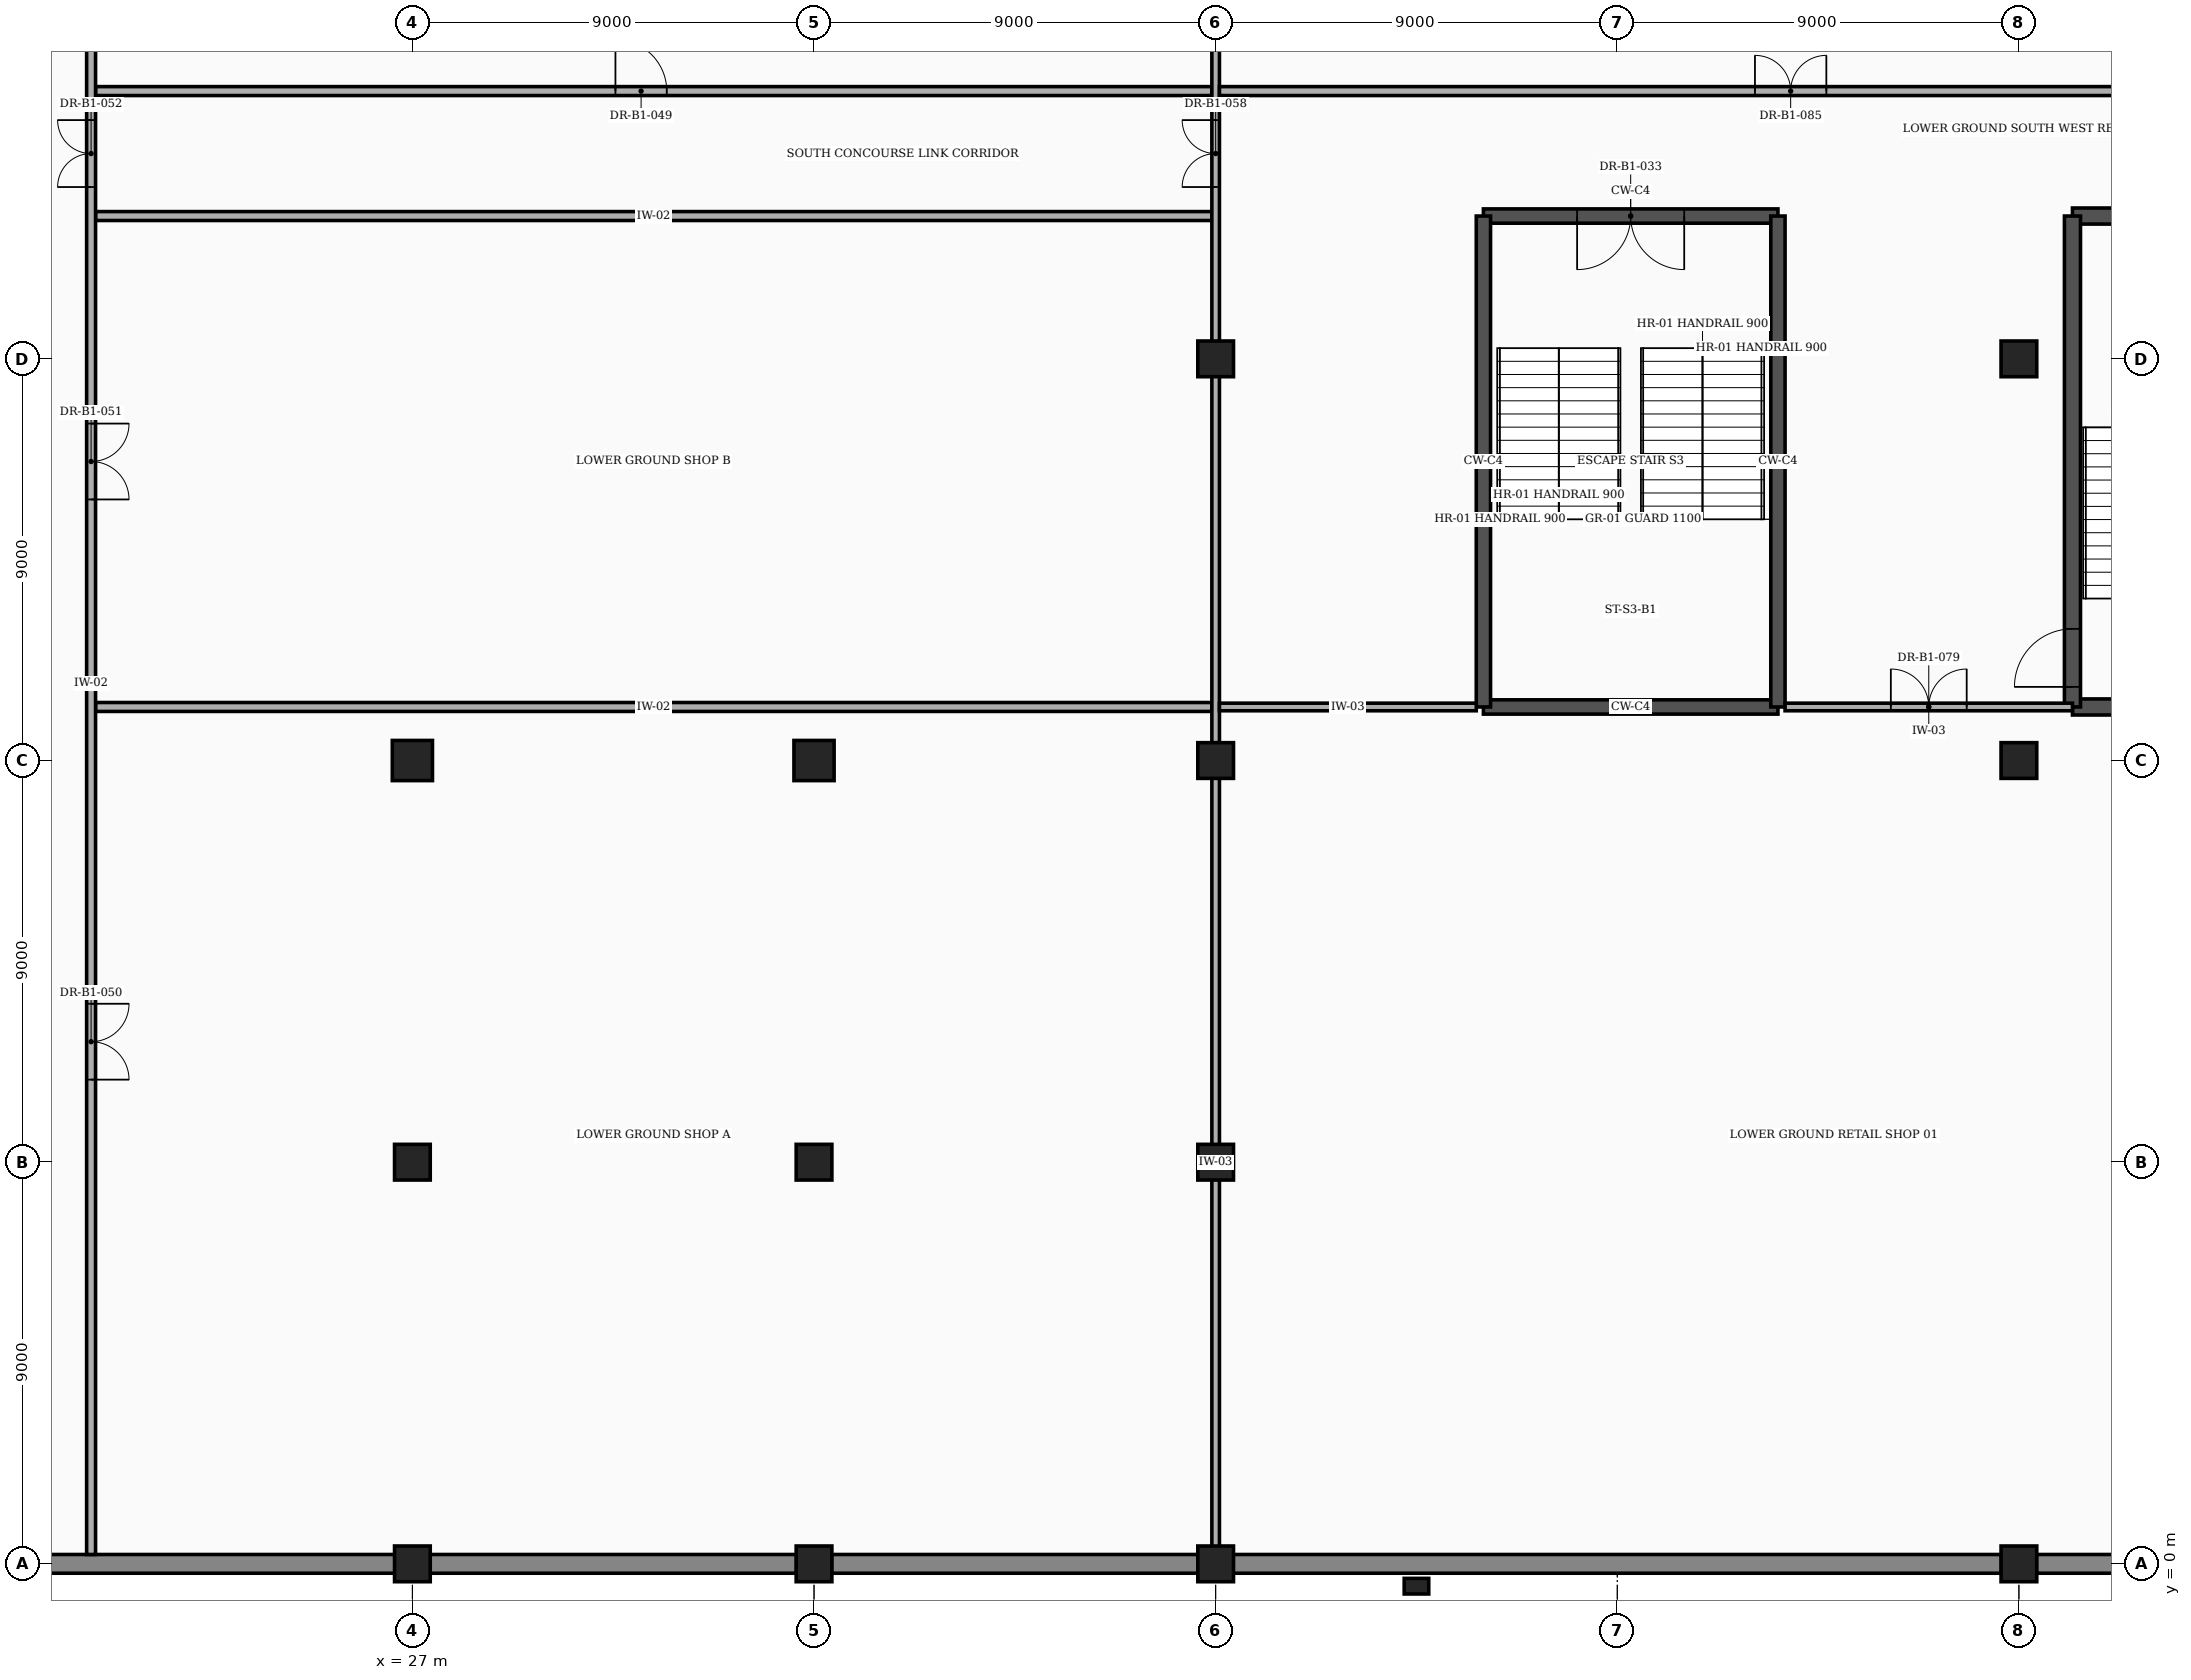
"""IFC4 building model, lengths in metres.
Left out: names, types, materials, properties, quantities, classifications, styles, units other than length and angle.
Written with IfcOpenShell. Run it as: python <this file> out.ifc"""

import sys

from ifc_helpers import new_model, si_unit, direction, frame, frame_2d, origin, origin_2d, place, context, subcontext, project, spatial, rectangle, extrude, element, fill, save


model = new_model("IFC4")
c1 = context("Model", 3, precision=1e-05, world=origin(), true_north=direction((0.0, 1.0)))
c2 = subcontext(c1, "Body", "Model", "MODEL_VIEW")
j1 = project(units=[si_unit("LENGTHUNIT", "METRE"), si_unit("PLANEANGLEUNIT", "RADIAN")], contexts=[c1])
p1 = place(None, origin())
s1 = spatial("IfcSite", under=j1, at=p1, CompositionType="ELEMENT")
p2 = place(p1, origin())
s2 = spatial("IfcBuilding", under=s1, at=p2, CompositionType="ELEMENT")
p3 = place(p2, frame((0.0, 0.0, -4.5)))
s3 = spatial("IfcBuildingStorey", under=s2, at=p3, CompositionType="ELEMENT", Elevation=-4.5)
for number, where, z_axis, x_axis in (
    (1, (27.0, 0.0, -0.45), (0.0, 0.0, 1.0), (1.0, 0.0, 0.0)),
    (2, (27.0, 9.0, -0.45), (0.0, 0.0, 1.0), (1.0, 0.0, 0.0)),
):
    element("IfcColumn", number, at=place(p3, frame(where, z_axis=z_axis, x_axis=x_axis)), inside=s3, PredefinedType="COLUMN", context=c2, shape_type="SweptSolid", body=[
        extrude(rectangle(XDim=0.8, YDim=0.8, at=origin_2d()), origin(), (0.0, 0.0, 1.0), 4.95),
    ])
p4 = place(p3, frame((27.0, 18.0, -0.45), z_axis=(0.0, 0.0, 1.0), x_axis=(1.0, 0.0, 0.0)))
e3 = element("IfcColumn", 3, at=p4, inside=s3, PredefinedType="COLUMN", context=c2, shape_type="SweptSolid", body=[
    extrude(rectangle(XDim=0.9, YDim=0.9, at=origin_2d()), origin(), (0.0, 0.0, 1.0), 4.95),
])
for number, where, z_axis, x_axis in (
    (4, (36.0, 0.0, -0.45), (0.0, 0.0, 1.0), (1.0, 0.0, 0.0)),
    (5, (36.0, 9.0, -0.45), (0.0, 0.0, 1.0), (1.0, 0.0, 0.0)),
):
    element("IfcColumn", number, at=place(p3, frame(where, z_axis=z_axis, x_axis=x_axis)), inside=s3, PredefinedType="COLUMN", context=c2, shape_type="SweptSolid", body=[
        extrude(rectangle(XDim=0.8, YDim=0.8, at=origin_2d()), origin(), (0.0, 0.0, 1.0), 4.95),
    ])
p5 = place(p3, frame((36.0, 18.0, -0.45), z_axis=(0.0, 0.0, 1.0), x_axis=(1.0, 0.0, 0.0)))
e6 = element("IfcColumn", 6, at=p5, inside=s3, PredefinedType="COLUMN", context=c2, shape_type="SweptSolid", body=[
    extrude(rectangle(XDim=0.9, YDim=0.9, at=origin_2d()), origin(), (0.0, 0.0, 1.0), 4.95),
])
for number, where, z_axis, x_axis in (
    (7, (45.0, 0.0, -0.45), (0.0, 0.0, 1.0), (1.0, 0.0, 0.0)),
    (8, (45.0, 9.0, -0.45), (0.0, 0.0, 1.0), (1.0, 0.0, 0.0)),
    (9, (45.0, 18.0, -0.45), (0.0, 0.0, 1.0), (1.0, 0.0, 0.0)),
    (10, (45.0, 27.0, -0.45), (0.0, 0.0, 1.0), (1.0, 0.0, 0.0)),
    (11, (63.0, 0.0, -0.45), (0.0, 0.0, 1.0), (1.0, 0.0, 0.0)),
    (12, (63.0, 18.0, -0.45), (0.0, 0.0, 1.0), (1.0, 0.0, 0.0)),
    (13, (63.0, 27.0, -0.45), (0.0, 0.0, 1.0), (1.0, 0.0, 0.0)),
):
    element("IfcColumn", number, at=place(p3, frame(where, z_axis=z_axis, x_axis=x_axis)), inside=s3, PredefinedType="COLUMN", context=c2, shape_type="SweptSolid", body=[
        extrude(rectangle(XDim=0.8, YDim=0.8, at=origin_2d()), origin(), (0.0, 0.0, 1.0), 4.95),
    ])
p6 = place(p3, frame((49.5, -0.5, -0.45), z_axis=(0.0, 0.0, 1.0), x_axis=(1.0, 0.0, 0.0)))
e14 = element("IfcColumn", 14, at=p6, inside=s3, PredefinedType="PILASTER", context=c2, shape_type="SweptSolid", body=[
    extrude(rectangle(XDim=0.55, YDim=0.35, at=origin_2d()), origin(), (0.0, 0.0, 1.0), 4.95),
])
p7 = place(p3, frame((9.392, 0.0, 0.0), z_axis=(0.0, 0.0, 1.0), x_axis=(1.0, 0.0, 0.0)))
e15 = element("IfcWall", 15, at=p7, inside=s3, PredefinedType="STANDARD", context=c2, shape_type="SweptSolid", body=[
    extrude(rectangle(XDim=17.216, YDim=0.42, at=frame_2d((8.608, 0.0))), origin(), (0.0, 0.0, 1.0), 3.7),
])
for number, where, z_axis, x_axis in (
    (16, (27.392, 0.0, 0.0), (0.0, 0.0, 1.0), (1.0, 0.0, 0.0)),
    (17, (36.392, 0.0, 0.0), (0.0, 0.0, 1.0), (1.0, 0.0, 0.0)),
):
    element("IfcWall", number, at=place(p3, frame(where, z_axis=z_axis, x_axis=x_axis)), inside=s3, PredefinedType="STANDARD", context=c2, shape_type="SweptSolid", body=[
        extrude(rectangle(XDim=8.216, YDim=0.42, at=frame_2d((4.108, 0.0))), origin(), (0.0, 0.0, 1.0), 3.7),
    ])
for number, where, z_axis, x_axis in (
    (18, (45.392, 0.0, 0.0), (0.0, 0.0, 1.0), (1.0, 0.0, 0.0)),
    (19, (63.392, 0.0, 0.0), (0.0, 0.0, 1.0), (1.0, 0.0, 0.0)),
):
    element("IfcWall", number, at=place(p3, frame(where, z_axis=z_axis, x_axis=x_axis)), inside=s3, PredefinedType="STANDARD", context=c2, shape_type="SweptSolid", body=[
        extrude(rectangle(XDim=17.216, YDim=0.42, at=frame_2d((8.608, 0.0))), origin(), (0.0, 0.0, 1.0), 3.7),
    ])
for number, where, z_axis, x_axis in (
    (20, (64.2, 19.2, 0.0), (0.0, 0.0, 1.0), (1.0, 0.0, 0.0)),
    (21, (64.2, 30.2, 0.0), (0.0, 0.0, 1.0), (1.0, 0.0, 0.0)),
):
    element("IfcWall", number, at=place(p3, frame(where, z_axis=z_axis, x_axis=x_axis)), inside=s3, PredefinedType="SHEAR", context=c2, shape_type="SweptSolid", body=[
        extrude(rectangle(XDim=6.6, YDim=0.36, at=frame_2d((3.3, 0.0))), origin(), (0.0, 0.0, 1.0), 4.24),
    ])
p8 = place(p3, frame((64.2, 19.2, 0.0), z_axis=(0.0, 0.0, 1.0), x_axis=(0.0, 1.0, 0.0)))
e22 = element("IfcWall", 22, at=p8, inside=s3, PredefinedType="SHEAR", context=c2, shape_type="SweptSolid", body=[
    extrude(rectangle(XDim=11.0, YDim=0.36, at=frame_2d((5.5, 0.0))), origin(), (0.0, 0.0, 1.0), 4.24),
])
p9 = place(p8, frame((0.45, 0.0, 0.0)))
e23 = element("IfcOpeningElement", 23, at=p9, cuts=e22, PredefinedType="OPENING", context=c2, shape_type="SweptSolid", body=[
    extrude(rectangle(XDim=1.3, YDim=2.2, at=frame_2d((0.65, 1.1))), frame((0.0, 0.192, 0.0), z_axis=(0.0, -1.0, 0.0), x_axis=(1.0, 0.0, 0.0)), (0.0, 0.0, 1.0), 0.384),
])
p10 = place(p3, frame((51.0, 19.2, 0.0), z_axis=(0.0, 0.0, 1.0), x_axis=(1.0, 0.0, 0.0)))
e24 = element("IfcWall", 24, at=p10, inside=s3, PredefinedType="SHEAR", context=c2, shape_type="SweptSolid", body=[
    extrude(rectangle(XDim=6.6, YDim=0.32, at=frame_2d((3.3, 0.0))), origin(), (0.0, 0.0, 1.0), 4.24),
])
p11 = place(p3, frame((51.0, 30.2, 0.0), z_axis=(0.0, 0.0, 1.0), x_axis=(1.0, 0.0, 0.0)))
e25 = element("IfcWall", 25, at=p11, inside=s3, PredefinedType="SHEAR", context=c2, shape_type="SweptSolid", body=[
    extrude(rectangle(XDim=6.6, YDim=0.32, at=frame_2d((3.3, 0.0))), origin(), (0.0, 0.0, 1.0), 4.24),
])
p12 = place(p11, frame((2.1, 0.0, 0.0)))
e26 = element("IfcOpeningElement", 26, at=p12, cuts=e25, PredefinedType="OPENING", context=c2, shape_type="SweptSolid", body=[
    extrude(rectangle(XDim=2.4, YDim=2.25, at=frame_2d((1.2, 1.125))), frame((0.0, 0.172, 0.0), z_axis=(0.0, -1.0, 0.0), x_axis=(1.0, 0.0, 0.0)), (0.0, 0.0, 1.0), 0.344),
])
for number, where, z_axis, x_axis in (
    (27, (51.0, 19.2, 0.0), (0.0, 0.0, 1.0), (0.0, 1.0, 0.0)),
    (28, (57.6, 19.2, 0.0), (0.0, 0.0, 1.0), (0.0, 1.0, 0.0)),
):
    element("IfcWall", number, at=place(p3, frame(where, z_axis=z_axis, x_axis=x_axis)), inside=s3, PredefinedType="SHEAR", context=c2, shape_type="SweptSolid", body=[
        extrude(rectangle(XDim=11.0, YDim=0.32, at=frame_2d((5.5, 0.0))), origin(), (0.0, 0.0, 1.0), 4.24),
    ])
for number, where, z_axis, x_axis in (
    (29, (19.9, 19.2, 0.0), (0.0, 0.0, 1.0), (1.0, 0.0, 0.0)),
    (30, (19.9, 30.2, 0.0), (0.0, 0.0, 1.0), (1.0, 0.0, 0.0)),
):
    element("IfcWall", number, at=place(p3, frame(where, z_axis=z_axis, x_axis=x_axis)), inside=s3, PredefinedType="PARTITIONING", context=c2, shape_type="SweptSolid", body=[
        extrude(rectangle(XDim=25.015, YDim=0.2, at=frame_2d((12.508, 0.0))), origin(), (0.0, 0.0, 1.0), 4.24),
    ])
p13 = place(p3, frame((19.9, 33.0, 0.0), z_axis=(0.0, 0.0, 1.0), x_axis=(1.0, 0.0, 0.0)))
e31 = element("IfcWall", 31, at=p13, inside=s3, PredefinedType="PARTITIONING", context=c2, shape_type="SweptSolid", body=[
    extrude(rectangle(XDim=25.015, YDim=0.2, at=frame_2d((12.508, 0.0))), origin(), (0.0, 0.0, 1.0), 4.24),
])
p14 = place(p13, frame((11.65, 0.0, 0.0)))
e32 = element("IfcOpeningElement", 32, at=p14, cuts=e31, PredefinedType="OPENING", context=c2, shape_type="SweptSolid", body=[
    extrude(rectangle(XDim=1.15, YDim=2.15, at=frame_2d((0.575, 1.075))), frame((0.0, 0.112, 0.0), z_axis=(0.0, -1.0, 0.0), x_axis=(1.0, 0.0, 0.0)), (0.0, 0.0, 1.0), 0.224),
])
p15 = place(p3, frame((19.8, 0.21, 0.0), z_axis=(0.0, 0.0, 1.0), x_axis=(0.0, 1.0, 0.0)))
e33 = element("IfcWall", 33, at=p15, inside=s3, PredefinedType="PARTITIONING", context=c2, shape_type="SweptSolid", body=[
    extrude(rectangle(XDim=39.03, YDim=0.2, at=frame_2d((19.515, 0.0))), origin(), (0.0, 0.0, 1.0), 4.24),
])
p16 = place(p15, frame((10.64, 0.0, 0.0)))
e34 = element("IfcOpeningElement", 34, at=p16, cuts=e33, PredefinedType="OPENING", context=c2, shape_type="SweptSolid", body=[
    extrude(rectangle(XDim=1.7, YDim=2.3, at=frame_2d((0.85, 1.15))), frame((0.0, 0.112, 0.0), z_axis=(0.0, -1.0, 0.0), x_axis=(1.0, 0.0, 0.0)), (0.0, 0.0, 1.0), 0.224),
])
p17 = place(p15, frame((23.64, 0.0, 0.0)))
e35 = element("IfcOpeningElement", 35, at=p17, cuts=e33, PredefinedType="OPENING", context=c2, shape_type="SweptSolid", body=[
    extrude(rectangle(XDim=1.7, YDim=2.3, at=frame_2d((0.85, 1.15))), frame((0.0, 0.112, 0.0), z_axis=(0.0, -1.0, 0.0), x_axis=(1.0, 0.0, 0.0)), (0.0, 0.0, 1.0), 0.224),
])
p18 = place(p15, frame((30.64, 0.0, 0.0)))
e36 = element("IfcOpeningElement", 36, at=p18, cuts=e33, PredefinedType="OPENING", context=c2, shape_type="SweptSolid", body=[
    extrude(rectangle(XDim=1.5, YDim=2.2, at=frame_2d((0.75, 1.1))), frame((0.0, 0.112, 0.0), z_axis=(0.0, -1.0, 0.0), x_axis=(1.0, 0.0, 0.0)), (0.0, 0.0, 1.0), 0.224),
])
p19 = place(p3, frame((45.0, 0.22, 0.0), z_axis=(0.0, 0.0, 1.0), x_axis=(0.0, 1.0, 0.0)))
e37 = element("IfcWall", 37, at=p19, inside=s3, PredefinedType="PARTITIONING", context=c2, shape_type="SweptSolid", body=[
    extrude(rectangle(XDim=17.56, YDim=0.17, at=frame_2d((8.78, 0.0))), origin(), (0.0, 0.0, 1.0), 3.707),
])
p20 = place(p3, frame((45.0, 18.22, 0.0), z_axis=(0.0, 0.0, 1.0), x_axis=(0.0, 1.0, 0.0)))
e38 = element("IfcWall", 38, at=p20, inside=s3, PredefinedType="PARTITIONING", context=c2, shape_type="SweptSolid", body=[
    extrude(rectangle(XDim=8.56, YDim=0.17, at=frame_2d((4.28, 0.0))), origin(), (0.0, 0.0, 1.0), 3.707),
])
p21 = place(p3, frame((45.0, 27.22, 0.0), z_axis=(0.0, 0.0, 1.0), x_axis=(0.0, 1.0, 0.0)))
e39 = element("IfcWall", 39, at=p21, inside=s3, PredefinedType="PARTITIONING", context=c2, shape_type="SweptSolid", body=[
    extrude(rectangle(XDim=8.56, YDim=0.17, at=frame_2d((4.28, 0.0))), origin(), (0.0, 0.0, 1.0), 3.707),
])
p22 = place(p21, frame((3.63, 0.0, 0.0)))
e40 = element("IfcOpeningElement", 40, at=p22, cuts=e39, PredefinedType="OPENING", context=c2, shape_type="SweptSolid", body=[
    extrude(rectangle(XDim=1.5, YDim=2.2, at=frame_2d((0.75, 1.1))), frame((0.0, 0.097, 0.0), z_axis=(0.0, -1.0, 0.0), x_axis=(1.0, 0.0, 0.0)), (0.0, 0.0, 1.0), 0.194),
])
p23 = place(p3, frame((45.085, 19.2, 0.0), z_axis=(0.0, 0.0, 1.0), x_axis=(1.0, 0.0, 0.0)))
e41 = element("IfcWall", 41, at=p23, inside=s3, PredefinedType="PARTITIONING", context=c2, shape_type="SweptSolid", body=[
    extrude(rectangle(XDim=5.755, YDim=0.17, at=frame_2d((2.877, 0.0))), origin(), (0.0, 0.0, 1.0), 4.24),
])
p24 = place(p3, frame((57.76, 19.2, 0.0), z_axis=(0.0, 0.0, 1.0), x_axis=(1.0, 0.0, 0.0)))
e42 = element("IfcWall", 42, at=p24, inside=s3, PredefinedType="PARTITIONING", context=c2, shape_type="SweptSolid", body=[
    extrude(rectangle(XDim=6.44, YDim=0.17, at=frame_2d((3.22, 0.0))), origin(), (0.0, 0.0, 1.0), 4.24),
])
p25 = place(p24, frame((2.37, 0.0, 0.0)))
e43 = element("IfcOpeningElement", 43, at=p25, cuts=e42, PredefinedType="OPENING", context=c2, shape_type="SweptSolid", body=[
    extrude(rectangle(XDim=1.7, YDim=2.3, at=frame_2d((0.85, 1.15))), frame((0.0, 0.097, 0.0), z_axis=(0.0, -1.0, 0.0), x_axis=(1.0, 0.0, 0.0)), (0.0, 0.0, 1.0), 0.194),
])
p26 = place(p3, frame((45.085, 33.0, 0.0), z_axis=(0.0, 0.0, 1.0), x_axis=(1.0, 0.0, 0.0)))
e44 = element("IfcWall", 44, at=p26, inside=s3, PredefinedType="PARTITIONING", context=c2, shape_type="SweptSolid", body=[
    extrude(rectangle(XDim=27.855, YDim=0.2, at=frame_2d((13.927, 0.0))), origin(), (0.0, 0.0, 1.0), 4.24),
])
p27 = place(p26, frame((12.0, 0.0, 0.0)))
e45 = element("IfcOpeningElement", 45, at=p27, cuts=e44, PredefinedType="OPENING", context=c2, shape_type="SweptSolid", body=[
    extrude(rectangle(XDim=1.6, YDim=2.3, at=frame_2d((0.8, 1.15))), frame((0.0, 0.112, 0.0), z_axis=(0.0, -1.0, 0.0), x_axis=(1.0, 0.0, 0.0)), (0.0, 0.0, 1.0), 0.224),
])
p28 = place(p9, origin())
e46 = element("IfcDoor", 46, at=p28, inside=s3, OperationType="SINGLE_SWING_LEFT", PredefinedType="DOOR", context=c2, shape_type="SweptSolid", body=[
    extrude(rectangle(XDim=1.3, YDim=2.2, at=frame_2d((0.65, 1.1))), frame((0.0, 0.025, 0.0), z_axis=(0.0, -1.0, 0.0), x_axis=(1.0, 0.0, 0.0)), (0.0, 0.0, 1.0), 0.05),
])
fill(e23, e46)
p29 = place(p12, frame((2.4, 0.0, 0.0), z_axis=(0.0, 0.0, 1.0), x_axis=(-1.0, 0.0, 0.0)))
e47 = element("IfcDoor", 47, at=p29, inside=s3, OperationType="DOUBLE_DOOR_SINGLE_SWING", PredefinedType="DOOR", context=c2, shape_type="SweptSolid", body=[
    extrude(rectangle(XDim=2.4, YDim=2.25, at=frame_2d((1.2, 1.125))), frame((0.0, 0.025, 0.0), z_axis=(0.0, -1.0, 0.0), x_axis=(1.0, 0.0, 0.0)), (0.0, 0.0, 1.0), 0.05),
])
fill(e26, e47)
p30 = place(p14, origin())
e48 = element("IfcDoor", 48, at=p30, inside=s3, OperationType="SINGLE_SWING_LEFT", PredefinedType="DOOR", context=c2, shape_type="SweptSolid", body=[
    extrude(rectangle(XDim=1.15, YDim=2.15, at=frame_2d((0.575, 1.075))), frame((0.0, 0.025, 0.0), z_axis=(0.0, -1.0, 0.0), x_axis=(1.0, 0.0, 0.0)), (0.0, 0.0, 1.0), 0.05),
])
fill(e32, e48)
p31 = place(p16, frame((1.7, 0.0, 0.0), z_axis=(0.0, 0.0, 1.0), x_axis=(-1.0, 0.0, 0.0)))
e49 = element("IfcDoor", 49, at=p31, inside=s3, OperationType="DOUBLE_DOOR_SINGLE_SWING", PredefinedType="DOOR", context=c2, shape_type="SweptSolid", body=[
    extrude(rectangle(XDim=1.7, YDim=2.3, at=frame_2d((0.85, 1.15))), frame((0.0, 0.025, 0.0), z_axis=(0.0, -1.0, 0.0), x_axis=(1.0, 0.0, 0.0)), (0.0, 0.0, 1.0), 0.05),
])
fill(e34, e49)
p32 = place(p17, frame((1.7, 0.0, 0.0), z_axis=(0.0, 0.0, 1.0), x_axis=(-1.0, 0.0, 0.0)))
e50 = element("IfcDoor", 50, at=p32, inside=s3, OperationType="DOUBLE_DOOR_SINGLE_SWING", PredefinedType="DOOR", context=c2, shape_type="SweptSolid", body=[
    extrude(rectangle(XDim=1.7, YDim=2.3, at=frame_2d((0.85, 1.15))), frame((0.0, 0.025, 0.0), z_axis=(0.0, -1.0, 0.0), x_axis=(1.0, 0.0, 0.0)), (0.0, 0.0, 1.0), 0.05),
])
fill(e35, e50)
p33 = place(p18, origin())
e51 = element("IfcDoor", 51, at=p33, inside=s3, OperationType="DOUBLE_DOOR_SINGLE_SWING", PredefinedType="DOOR", context=c2, shape_type="SweptSolid", body=[
    extrude(rectangle(XDim=1.5, YDim=2.2, at=frame_2d((0.75, 1.1))), frame((0.0, 0.025, 0.0), z_axis=(0.0, -1.0, 0.0), x_axis=(1.0, 0.0, 0.0)), (0.0, 0.0, 1.0), 0.05),
])
fill(e36, e51)
p34 = place(p22, origin())
e52 = element("IfcDoor", 52, at=p34, inside=s3, OperationType="DOUBLE_DOOR_SINGLE_SWING", PredefinedType="DOOR", context=c2, shape_type="SweptSolid", body=[
    extrude(rectangle(XDim=1.5, YDim=2.2, at=frame_2d((0.75, 1.1))), frame((0.0, 0.025, 0.0), z_axis=(0.0, -1.0, 0.0), x_axis=(1.0, 0.0, 0.0)), (0.0, 0.0, 1.0), 0.05),
])
fill(e40, e52)
p35 = place(p25, origin())
e53 = element("IfcDoor", 53, at=p35, inside=s3, OperationType="DOUBLE_DOOR_SINGLE_SWING", PredefinedType="DOOR", context=c2, shape_type="SweptSolid", body=[
    extrude(rectangle(XDim=1.7, YDim=2.3, at=frame_2d((0.85, 1.15))), frame((0.0, 0.025, 0.0), z_axis=(0.0, -1.0, 0.0), x_axis=(1.0, 0.0, 0.0)), (0.0, 0.0, 1.0), 0.05),
])
fill(e43, e53)
p36 = place(p27, origin())
e54 = element("IfcDoor", 54, at=p36, inside=s3, OperationType="DOUBLE_DOOR_SINGLE_SWING", PredefinedType="DOOR", context=c2, shape_type="SweptSolid", body=[
    extrude(rectangle(XDim=1.6, YDim=2.3, at=frame_2d((0.8, 1.15))), frame((0.0, 0.025, 0.0), z_axis=(0.0, -1.0, 0.0), x_axis=(1.0, 0.0, 0.0)), (0.0, 0.0, 1.0), 0.05),
])
fill(e45, e54)
save(model, sys.argv[1])
